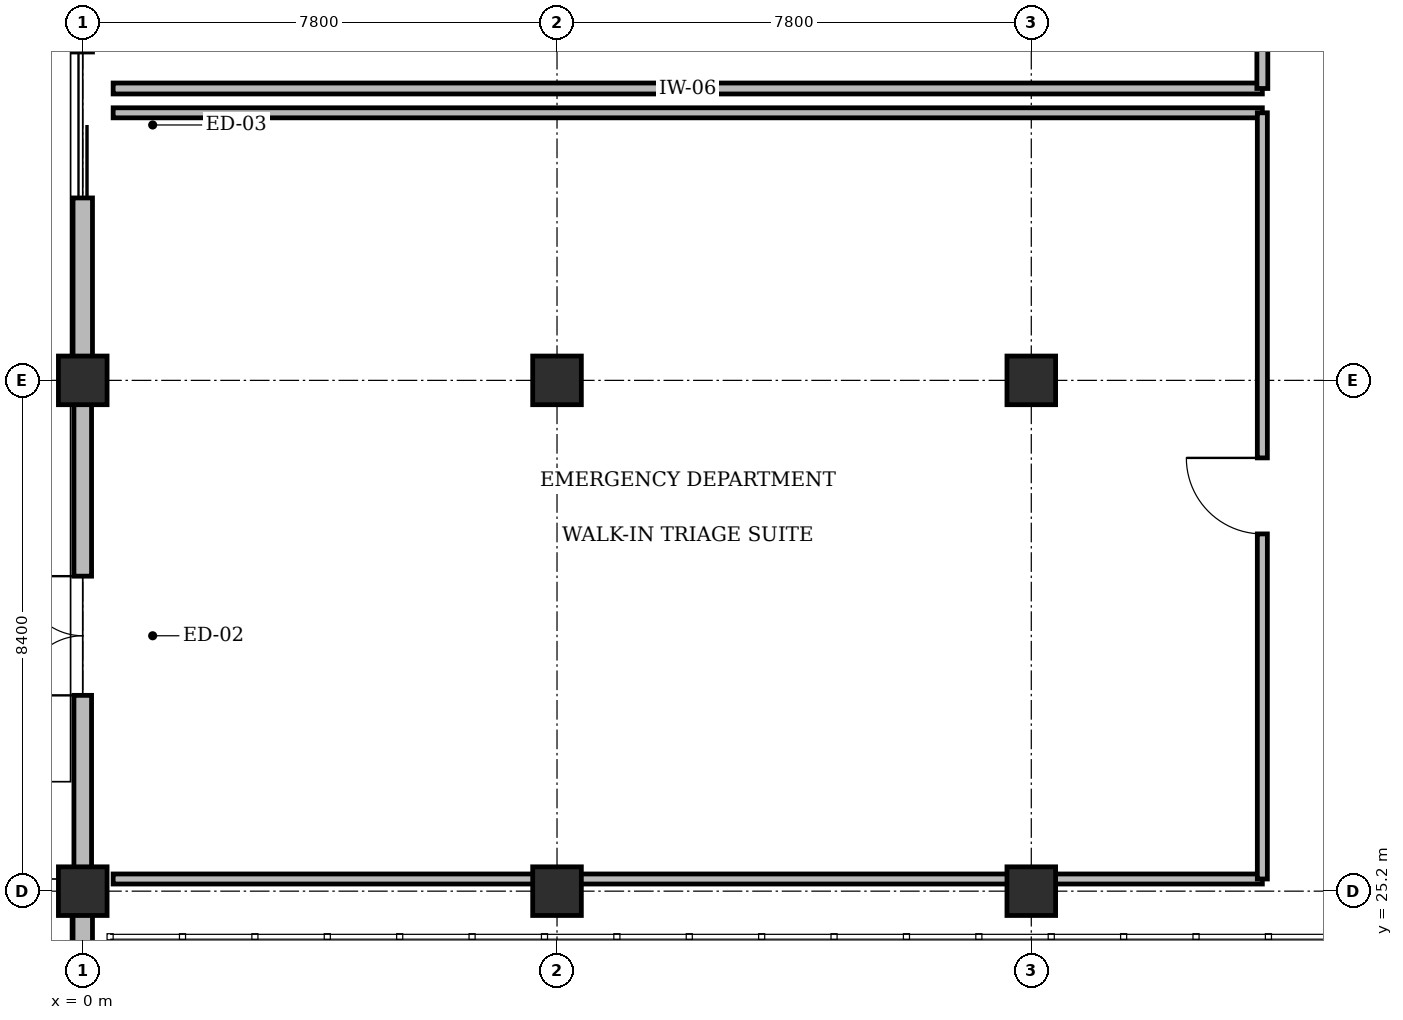
"""IFC4 building model, lengths in metres.
Left out: names, types, materials, properties, quantities, classifications, styles, units other than length and angle.
Written with IfcOpenShell. Run it as: python <this file> out.ifc"""

import sys

from ifc_helpers import new_model, si_unit, direction, frame, frame_2d, origin, origin_2d, place, context, subcontext, project, spatial, rectangle, extrude, element, fill, save


model = new_model("IFC4")
c1 = context("Model", 3, precision=1e-05, world=origin(), true_north=direction((0.0, 1.0)))
c2 = subcontext(c1, "Body", "Model", "MODEL_VIEW")
j1 = project(units=[si_unit("LENGTHUNIT", "METRE"), si_unit("PLANEANGLEUNIT", "RADIAN")], contexts=[c1])
p1 = place(None, origin())
s1 = spatial("IfcSite", under=j1, at=p1, CompositionType="ELEMENT")
p2 = place(p1, origin())
s2 = spatial("IfcBuilding", under=s1, at=p2, CompositionType="ELEMENT")
p3 = place(p2, origin())
s3 = spatial("IfcBuildingStorey", under=s2, at=p3, CompositionType="ELEMENT", Elevation=0.0)
for number, where, z_axis, x_axis in (
    (1, (0.0, 25.2, 0.0), (0.0, 0.0, 1.0), (1.0, 0.0, 0.0)),
    (2, (0.0, 33.6, 0.0), (0.0, 0.0, 1.0), (1.0, 0.0, 0.0)),
    (3, (7.8, 25.2, 0.0), (0.0, 0.0, 1.0), (1.0, 0.0, 0.0)),
    (4, (7.8, 33.6, 0.0), (0.0, 0.0, 1.0), (1.0, 0.0, 0.0)),
    (5, (15.6, 25.2, 0.0), (0.0, 0.0, 1.0), (1.0, 0.0, 0.0)),
    (6, (15.6, 33.6, 0.0), (0.0, 0.0, 1.0), (1.0, 0.0, 0.0)),
):
    element("IfcColumn", number, at=place(p3, frame(where, z_axis=z_axis, x_axis=x_axis)), inside=s3, PredefinedType="COLUMN", context=c2, shape_type="SweptSolid", body=[
        extrude(rectangle(XDim=0.8, YDim=0.8, at=origin_2d()), origin(), (0.0, 0.0, 1.0), 4.8),
    ])
p4 = place(p3, frame((0.0, 17.14, 0.0), z_axis=(0.0, 0.0, 1.0), x_axis=(0.0, 1.0, 0.0)))
e7 = element("IfcWall", 7, at=p4, inside=s3, PredefinedType="STANDARD", context=c2, shape_type="SweptSolid", body=[
    extrude(rectangle(XDim=7.72, YDim=0.32, at=frame_2d((3.86, 0.0))), origin(), (0.0, 0.0, 1.0), 3.615),
])
p5 = place(p4, frame((1.514, 0.0, 0.0)))
e8 = element("IfcOpeningElement", 8, at=p5, cuts=e7, PredefinedType="OPENING", context=c2, shape_type="SweptSolid", body=[
    extrude(rectangle(XDim=5.0, YDim=3.1, at=frame_2d((2.5, 1.55))), frame((0.0, 0.17, 0.0), z_axis=(0.0, -1.0, 0.0), x_axis=(1.0, 0.0, 0.0)), (0.0, 0.0, 1.0), 0.34),
])
p6 = place(p3, frame((0.0, 25.54, 0.0), z_axis=(0.0, 0.0, 1.0), x_axis=(0.0, 1.0, 0.0)))
e9 = element("IfcWall", 9, at=p6, inside=s3, PredefinedType="STANDARD", context=c2, shape_type="SweptSolid", body=[
    extrude(rectangle(XDim=7.72, YDim=0.29, at=frame_2d((3.86, 0.0))), origin(), (0.0, 0.0, 1.0), 3.615),
])
p7 = place(p6, frame((2.88, 0.0, 0.0)))
e10 = element("IfcOpeningElement", 10, at=p7, cuts=e9, PredefinedType="OPENING", context=c2, shape_type="SweptSolid", body=[
    extrude(rectangle(XDim=1.96, YDim=2.2, at=frame_2d((0.98, 1.1))), frame((0.0, 0.155, 0.0), z_axis=(0.0, -1.0, 0.0), x_axis=(1.0, 0.0, 0.0)), (0.0, 0.0, 1.0), 0.31),
])
p8 = place(p3, frame((0.0, 33.94, 0.0), z_axis=(0.0, 0.0, 1.0), x_axis=(0.0, 1.0, 0.0)))
e11 = element("IfcWall", 11, at=p8, inside=s3, PredefinedType="STANDARD", context=c2, shape_type="SweptSolid", body=[
    extrude(rectangle(XDim=7.72, YDim=0.32, at=frame_2d((3.86, 0.0))), origin(), (0.0, 0.0, 1.0), 3.615),
])
p9 = place(p8, frame((2.66, 0.0, 0.0)))
e12 = element("IfcOpeningElement", 12, at=p9, cuts=e11, PredefinedType="OPENING", context=c2, shape_type="SweptSolid", body=[
    extrude(rectangle(XDim=2.4, YDim=2.35, at=frame_2d((1.2, 1.175))), frame((0.0, 0.17, 0.0), z_axis=(0.0, -1.0, 0.0), x_axis=(1.0, 0.0, 0.0)), (0.0, 0.0, 1.0), 0.34),
])
p10 = place(p3, frame((0.5, 25.4, 0.0), z_axis=(0.0, 0.0, 1.0), x_axis=(1.0, 0.0, 0.0)))
e13 = element("IfcWall", 13, at=p10, inside=s3, PredefinedType="PARTITIONING", context=c2, shape_type="SweptSolid", body=[
    extrude(rectangle(XDim=18.9, YDim=0.165, at=frame_2d((9.45, 0.0))), origin(), (0.0, 0.0, 1.0), 3.63),
])
p11 = place(p3, frame((0.5, 38.0, 0.0), z_axis=(0.0, 0.0, 1.0), x_axis=(1.0, 0.0, 0.0)))
e14 = element("IfcWall", 14, at=p11, inside=s3, PredefinedType="PARTITIONING", context=c2, shape_type="SweptSolid", body=[
    extrude(rectangle(XDim=18.9, YDim=0.165, at=frame_2d((9.45, 0.0))), origin(), (0.0, 0.0, 1.0), 4.46),
])
p12 = place(p3, frame((19.4, 25.4, 0.0), z_axis=(0.0, 0.0, 1.0), x_axis=(0.0, 1.0, 0.0)))
e15 = element("IfcWall", 15, at=p12, inside=s3, PredefinedType="PARTITIONING", context=c2, shape_type="SweptSolid", body=[
    extrude(rectangle(XDim=12.6, YDim=0.165, at=frame_2d((6.3, 0.0))), origin(), (0.0, 0.0, 1.0), 4.46),
])
p13 = place(p12, frame((5.675, 0.0, 0.0)))
e16 = element("IfcOpeningElement", 16, at=p13, cuts=e15, PredefinedType="OPENING", context=c2, shape_type="SweptSolid", body=[
    extrude(rectangle(XDim=1.25, YDim=2.15, at=frame_2d((0.625, 1.075))), frame((0.0, 0.093, 0.0), z_axis=(0.0, -1.0, 0.0), x_axis=(1.0, 0.0, 0.0)), (0.0, 0.0, 1.0), 0.185),
])
p14 = place(p3, frame((0.5, 38.4, 0.0), z_axis=(0.0, 0.0, 1.0), x_axis=(1.0, 0.0, 0.0)))
e17 = element("IfcWall", 17, at=p14, inside=s3, PredefinedType="PARTITIONING", context=c2, shape_type="SweptSolid", body=[
    extrude(rectangle(XDim=18.9, YDim=0.18, at=frame_2d((9.45, 0.0))), origin(), (0.0, 0.0, 1.0), 4.46),
])
p15 = place(p3, frame((19.4, 38.4, 0.0), z_axis=(0.0, 0.0, 1.0), x_axis=(0.0, 1.0, 0.0)))
e18 = element("IfcWall", 18, at=p15, inside=s3, PredefinedType="PARTITIONING", context=c2, shape_type="SweptSolid", body=[
    extrude(rectangle(XDim=8.6, YDim=0.18, at=frame_2d((4.3, 0.0))), origin(), (0.0, 0.0, 1.0), 4.46),
])
p16 = place(p7, origin())
e19 = element("IfcDoor", 19, at=p16, inside=s3, OperationType="DOUBLE_DOOR_SINGLE_SWING", PredefinedType="DOOR", context=c2, shape_type="SweptSolid", body=[
    extrude(rectangle(XDim=1.96, YDim=2.2, at=frame_2d((0.98, 1.1))), frame((0.0, 0.025, 0.0), z_axis=(0.0, -1.0, 0.0), x_axis=(1.0, 0.0, 0.0)), (0.0, 0.0, 1.0), 0.05),
])
fill(e10, e19)
p17 = place(p9, origin())
e20 = element("IfcDoor", 20, at=p17, inside=s3, OperationType="SLIDING_TO_LEFT", PredefinedType="DOOR", context=c2, shape_type="SweptSolid", body=[
    extrude(rectangle(XDim=2.4, YDim=2.35, at=frame_2d((1.2, 1.175))), frame((0.0, 0.025, 0.0), z_axis=(0.0, -1.0, 0.0), x_axis=(1.0, 0.0, 0.0)), (0.0, 0.0, 1.0), 0.05),
])
fill(e12, e20)
p18 = place(p13, origin())
e21 = element("IfcDoor", 21, at=p18, inside=s3, OperationType="SINGLE_SWING_RIGHT", PredefinedType="DOOR", context=c2, shape_type="SweptSolid", body=[
    extrude(rectangle(XDim=1.25, YDim=2.15, at=frame_2d((0.625, 1.075))), frame((0.0, 0.025, 0.0), z_axis=(0.0, -1.0, 0.0), x_axis=(1.0, 0.0, 0.0)), (0.0, 0.0, 1.0), 0.05),
])
fill(e16, e21)
save(model, sys.argv[1])
